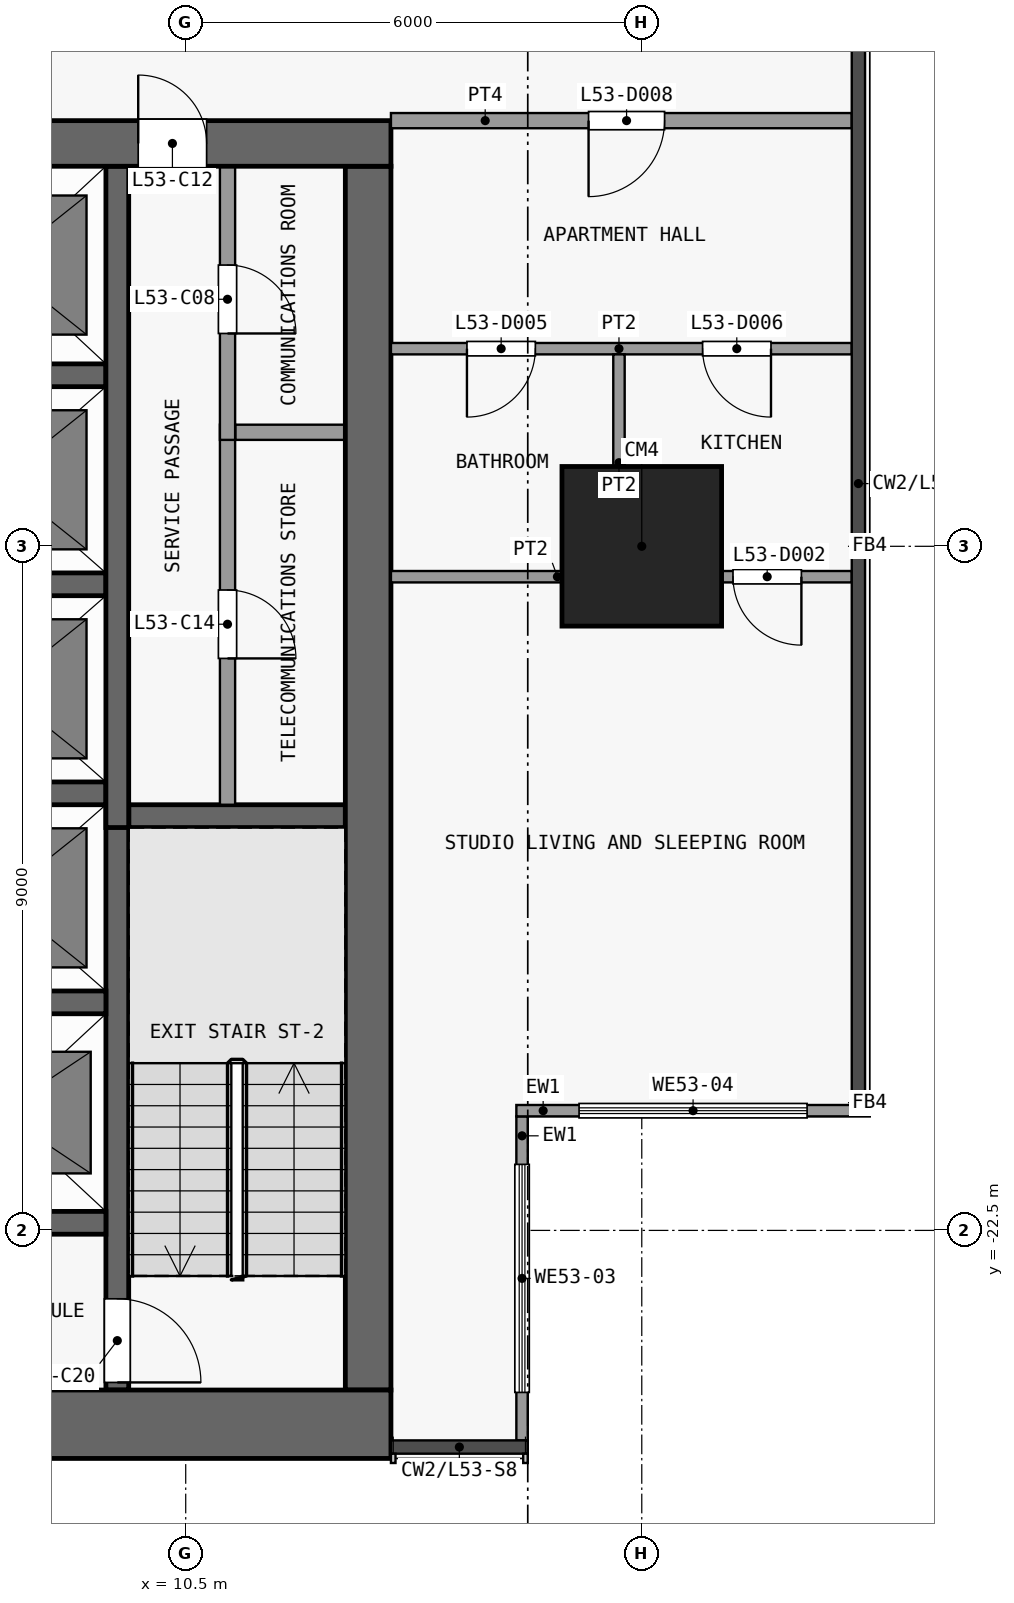
"""IFC4 building model, lengths in metres.
Left out: names, types, materials, properties, quantities, classifications, styles, units other than length and angle.
Written with IfcOpenShell. Run it as: python <this file> out.ifc"""

import sys

from ifc_helpers import new_model, si_unit, direction, frame, frame_2d, origin, origin_2d, place, context, subcontext, project, spatial, rectangle, extrude, element, fill, save


model = new_model("IFC4")
c1 = context("Model", 3, precision=1e-05, world=origin(), true_north=direction((0.0, 1.0)))
c2 = subcontext(c1, "Body", "Model", "MODEL_VIEW")
j1 = project(units=[si_unit("LENGTHUNIT", "METRE"), si_unit("PLANEANGLEUNIT", "RADIAN")], contexts=[c1])
p1 = place(None, origin())
s1 = spatial("IfcSite", under=j1, at=p1, CompositionType="ELEMENT")
p2 = place(p1, origin())
s2 = spatial("IfcBuilding", under=s1, at=p2, CompositionType="ELEMENT")
p3 = place(p2, frame((0.0, 0.0, 212.3)))
s3 = spatial("IfcBuildingStorey", under=s2, at=p3, CompositionType="ELEMENT", Elevation=212.3)
p4 = place(p3, frame((16.5, -13.5, 0.0), z_axis=(0.0, 0.0, 1.0), x_axis=(1.0, 0.0, 0.0)))
e1 = element("IfcColumn", 1, at=p4, inside=s3, PredefinedType="COLUMN", context=c2, shape_type="SweptSolid", body=[
    extrude(rectangle(XDim=2.1, YDim=2.1, at=origin_2d()), origin(), (0.0, 0.0, 1.0), 3.6),
])
p5 = place(p3, frame((-13.2, -25.05, 0.0), z_axis=(0.0, 0.0, 1.0), x_axis=(1.0, 0.0, 0.0)))
e2 = element("IfcWall", 2, at=p5, inside=s3, PredefinedType="SHEAR", context=c2, shape_type="SweptSolid", body=[
    extrude(rectangle(XDim=26.4, YDim=0.9, at=frame_2d((13.2, 0.0))), origin(), (0.0, 0.0, 1.0), 3.3),
])
p6 = place(p3, frame((-13.2, -8.2, 0.0), z_axis=(0.0, 0.0, 1.0), x_axis=(1.0, 0.0, 0.0)))
e3 = element("IfcWall", 3, at=p6, inside=s3, PredefinedType="SHEAR", context=c2, shape_type="SweptSolid", body=[
    extrude(rectangle(XDim=26.4, YDim=0.6, at=frame_2d((13.2, 0.0))), origin(), (0.0, 0.0, 1.0), 3.3),
])
p7 = place(p6, frame((7.5, 0.0, 0.0)))
e4 = element("IfcOpeningElement", 4, at=p7, cuts=e3, PredefinedType="OPENING", context=c2, shape_type="SweptSolid", body=[
    extrude(rectangle(XDim=1.8, YDim=2.1, at=frame_2d((0.9, 1.05))), frame((0.0, 0.31, 0.0), z_axis=(0.0, -1.0, 0.0), x_axis=(1.0, 0.0, 0.0)), (0.0, 0.0, 1.0), 0.62),
])
p8 = place(p6, frame((17.1, 0.0, 0.0)))
e5 = element("IfcOpeningElement", 5, at=p8, cuts=e3, PredefinedType="OPENING", context=c2, shape_type="SweptSolid", body=[
    extrude(rectangle(XDim=1.8, YDim=2.1, at=frame_2d((0.9, 1.05))), frame((0.0, 0.31, 0.0), z_axis=(0.0, -1.0, 0.0), x_axis=(1.0, 0.0, 0.0)), (0.0, 0.0, 1.0), 0.62),
])
p9 = place(p6, frame((2.425, 0.0, 0.0)))
e6 = element("IfcOpeningElement", 6, at=p9, cuts=e3, PredefinedType="OPENING", context=c2, shape_type="SweptSolid", body=[
    extrude(rectangle(XDim=0.9, YDim=2.1, at=frame_2d((0.45, 1.05))), frame((0.0, 0.31, 0.0), z_axis=(0.0, -1.0, 0.0), x_axis=(1.0, 0.0, 0.0)), (0.0, 0.0, 1.0), 0.62),
])
p10 = place(p6, frame((23.075, 0.0, 0.0)))
e7 = element("IfcOpeningElement", 7, at=p10, cuts=e3, PredefinedType="OPENING", context=c2, shape_type="SweptSolid", body=[
    extrude(rectangle(XDim=0.9, YDim=2.1, at=frame_2d((0.45, 1.05))), frame((0.0, 0.31, 0.0), z_axis=(0.0, -1.0, 0.0), x_axis=(1.0, 0.0, 0.0)), (0.0, 0.0, 1.0), 0.62),
])
p11 = place(p3, frame((12.9, -24.6, 0.0), z_axis=(0.0, 0.0, 1.0), x_axis=(0.0, 1.0, 0.0)))
e8 = element("IfcWall", 8, at=p11, inside=s3, PredefinedType="SHEAR", context=c2, shape_type="SweptSolid", body=[
    extrude(rectangle(XDim=16.1, YDim=0.6, at=frame_2d((8.05, 0.0))), origin(), (0.0, 0.0, 1.0), 3.3),
])
for number, where, z_axis, x_axis in (
    (9, (6.65, -22.4, 0.0), (0.0, 0.0, 1.0), (1.0, 0.0, 0.0)),
    (10, (6.65, -19.5, 0.0), (0.0, 0.0, 1.0), (1.0, 0.0, 0.0)),
):
    element("IfcWall", number, at=place(p3, frame(where, z_axis=z_axis, x_axis=x_axis)), inside=s3, PredefinedType="SHEAR", context=c2, shape_type="SweptSolid", body=[
        extrude(rectangle(XDim=2.8, YDim=0.3, at=frame_2d((1.4, 0.0))), origin(), (0.0, 0.0, 1.0), 3.3),
    ])
p12 = place(p3, frame((9.75, -17.05, 0.0), z_axis=(0.0, 0.0, 1.0), x_axis=(1.0, 0.0, 0.0)))
e11 = element("IfcWall", 11, at=p12, inside=s3, PredefinedType="SHEAR", context=c2, shape_type="SweptSolid", body=[
    extrude(rectangle(XDim=2.85, YDim=0.3, at=frame_2d((1.425, 0.0))), origin(), (0.0, 0.0, 1.0), 3.3),
])
for number, where, z_axis, x_axis in (
    (12, (6.65, -16.75, 0.0), (0.0, 0.0, 1.0), (1.0, 0.0, 0.0)),
    (13, (6.65, -14.0, 0.0), (0.0, 0.0, 1.0), (1.0, 0.0, 0.0)),
):
    element("IfcWall", number, at=place(p3, frame(where, z_axis=z_axis, x_axis=x_axis)), inside=s3, PredefinedType="SHEAR", context=c2, shape_type="SweptSolid", body=[
        extrude(rectangle(XDim=2.8, YDim=0.3, at=frame_2d((1.4, 0.0))), origin(), (0.0, 0.0, 1.0), 3.3),
    ])
p13 = place(p3, frame((11.15, -12.0, 0.0), z_axis=(0.0, 0.0, 1.0), x_axis=(1.0, 0.0, 0.0)))
e14 = element("IfcWall", 14, at=p13, inside=s3, PredefinedType="PARTITIONING", context=c2, shape_type="SweptSolid", body=[
    extrude(rectangle(XDim=1.45, YDim=0.2, at=frame_2d((0.725, 0.0))), origin(), (0.0, 0.0, 1.0), 3.3),
])
p14 = place(p3, frame((6.65, -11.25, 0.0), z_axis=(0.0, 0.0, 1.0), x_axis=(1.0, 0.0, 0.0)))
e15 = element("IfcWall", 15, at=p14, inside=s3, PredefinedType="SHEAR", context=c2, shape_type="SweptSolid", body=[
    extrude(rectangle(XDim=2.8, YDim=0.3, at=frame_2d((1.4, 0.0))), origin(), (0.0, 0.0, 1.0), 3.3),
])
p15 = place(p3, frame((9.6, -16.9, 0.0), z_axis=(0.0, 0.0, 1.0), x_axis=(0.0, -1.0, 0.0)))
e16 = element("IfcWall", 16, at=p15, inside=s3, PredefinedType="SHEAR", context=c2, shape_type="SweptSolid", body=[
    extrude(rectangle(XDim=7.7, YDim=0.3, at=frame_2d((3.85, 0.0))), origin(), (0.0, 0.0, 1.0), 3.3),
])
p16 = place(p15, frame((6.5, 0.0, 0.0)))
e17 = element("IfcOpeningElement", 17, at=p16, cuts=e16, PredefinedType="OPENING", context=c2, shape_type="SweptSolid", body=[
    extrude(rectangle(XDim=1.1, YDim=2.1, at=frame_2d((0.55, 1.05))), frame((0.0, 0.16, 0.0), z_axis=(0.0, -1.0, 0.0), x_axis=(1.0, 0.0, 0.0)), (0.0, 0.0, 1.0), 0.32),
])
p17 = place(p3, frame((9.6, -17.2, 0.0), z_axis=(0.0, 0.0, 1.0), x_axis=(0.0, 1.0, 0.0)))
e18 = element("IfcWall", 18, at=p17, inside=s3, PredefinedType="SHEAR", context=c2, shape_type="SweptSolid", body=[
    extrude(rectangle(XDim=8.7, YDim=0.3, at=frame_2d((4.35, 0.0))), origin(), (0.0, 0.0, 1.0), 3.3),
])
p18 = place(p3, frame((11.05, -11.9, 0.0), z_axis=(0.0, 0.0, 1.0), x_axis=(0.0, -1.0, 0.0)))
e19 = element("IfcWall", 19, at=p18, inside=s3, PredefinedType="PARTITIONING", context=c2, shape_type="SweptSolid", body=[
    extrude(rectangle(XDim=5.0, YDim=0.2, at=frame_2d((2.5, 0.0))), origin(), (0.0, 0.0, 1.0), 3.3),
])
p19 = place(p18, frame((2.175, 0.0, 0.0)))
e20 = element("IfcOpeningElement", 20, at=p19, cuts=e19, PredefinedType="OPENING", context=c2, shape_type="SweptSolid", body=[
    extrude(rectangle(XDim=0.9, YDim=2.1, at=frame_2d((0.45, 1.05))), frame((0.0, 0.11, 0.0), z_axis=(0.0, -1.0, 0.0), x_axis=(1.0, 0.0, 0.0)), (0.0, 0.0, 1.0), 0.22),
])
p20 = place(p3, frame((11.05, -8.5, 0.0), z_axis=(0.0, 0.0, 1.0), x_axis=(0.0, -1.0, 0.0)))
e21 = element("IfcWall", 21, at=p20, inside=s3, PredefinedType="PARTITIONING", context=c2, shape_type="SweptSolid", body=[
    extrude(rectangle(XDim=3.6, YDim=0.2, at=frame_2d((1.8, 0.0))), origin(), (0.0, 0.0, 1.0), 3.3),
])
p21 = place(p20, frame((1.3, 0.0, 0.0)))
e22 = element("IfcOpeningElement", 22, at=p21, cuts=e21, PredefinedType="OPENING", context=c2, shape_type="SweptSolid", body=[
    extrude(rectangle(XDim=0.9, YDim=2.1, at=frame_2d((0.45, 1.05))), frame((0.0, 0.11, 0.0), z_axis=(0.0, -1.0, 0.0), x_axis=(1.0, 0.0, 0.0)), (0.0, 0.0, 1.0), 0.22),
])
p22 = place(p3, frame((14.925, -21.0, 0.0), z_axis=(0.0, 0.0, 1.0), x_axis=(0.0, -1.0, 0.0)))
e23 = element("IfcWall", 23, at=p22, inside=s3, PredefinedType="SOLIDWALL", context=c2, shape_type="SweptSolid", body=[
    extrude(rectangle(XDim=4.262, YDim=0.15, at=frame_2d((2.131, 0.0))), origin(), (0.0, 0.0, 1.0), 3.3),
])
p23 = place(p22, frame((0.631, 0.0, 0.9)))
e24 = element("IfcOpeningElement", 24, at=p23, cuts=e23, PredefinedType="OPENING", context=c2, shape_type="SweptSolid", body=[
    extrude(rectangle(XDim=3.0, YDim=2.4, at=frame_2d((1.5, 1.2))), frame((0.0, 0.085, 0.0), z_axis=(0.0, -1.0, 0.0), x_axis=(1.0, 0.0, 0.0)), (0.0, 0.0, 1.0), 0.17),
])
p24 = place(p3, frame((19.5, -20.925, 0.0), z_axis=(0.0, 0.0, 1.0), x_axis=(-1.0, 0.0, 0.0)))
e25 = element("IfcWall", 25, at=p24, inside=s3, PredefinedType="SOLIDWALL", context=c2, shape_type="SweptSolid", body=[
    extrude(rectangle(XDim=4.65, YDim=0.15, at=frame_2d((2.325, 0.0))), origin(), (0.0, 0.0, 1.0), 3.3),
])
p25 = place(p24, frame((0.825, 0.0, 0.9)))
e26 = element("IfcOpeningElement", 26, at=p25, cuts=e25, PredefinedType="OPENING", context=c2, shape_type="SweptSolid", body=[
    extrude(rectangle(XDim=3.0, YDim=2.4, at=frame_2d((1.5, 1.2))), frame((0.0, 0.085, 0.0), z_axis=(0.0, -1.0, 0.0), x_axis=(1.0, 0.0, 0.0)), (0.0, 0.0, 1.0), 0.17),
])
p26 = place(p3, frame((13.2, -13.9, 0.0), z_axis=(0.0, 0.0, 1.0), x_axis=(1.0, 0.0, 0.0)))
e27 = element("IfcWall", 27, at=p26, inside=s3, PredefinedType="PARTITIONING", context=c2, shape_type="SweptSolid", body=[
    extrude(rectangle(XDim=6.062, YDim=0.15, at=frame_2d((3.031, 0.0))), origin(), (0.0, 0.0, 1.0), 3.3),
])
p27 = place(p26, frame((4.5, 0.0, 0.0)))
e28 = element("IfcOpeningElement", 28, at=p27, cuts=e27, PredefinedType="OPENING", context=c2, shape_type="SweptSolid", body=[
    extrude(rectangle(XDim=0.9, YDim=2.1, at=frame_2d((0.45, 1.05))), frame((0.0, 0.085, 0.0), z_axis=(0.0, -1.0, 0.0), x_axis=(1.0, 0.0, 0.0)), (0.0, 0.0, 1.0), 0.17),
])
p28 = place(p3, frame((13.2, -10.9, 0.0), z_axis=(0.0, 0.0, 1.0), x_axis=(1.0, 0.0, 0.0)))
e29 = element("IfcWall", 29, at=p28, inside=s3, PredefinedType="PARTITIONING", context=c2, shape_type="SweptSolid", body=[
    extrude(rectangle(XDim=6.062, YDim=0.15, at=frame_2d((3.031, 0.0))), origin(), (0.0, 0.0, 1.0), 3.3),
])
p29 = place(p28, frame((1.0, 0.0, 0.0)))
e30 = element("IfcOpeningElement", 30, at=p29, cuts=e29, PredefinedType="OPENING", context=c2, shape_type="SweptSolid", body=[
    extrude(rectangle(XDim=0.9, YDim=2.1, at=frame_2d((0.45, 1.05))), frame((0.0, 0.085, 0.0), z_axis=(0.0, -1.0, 0.0), x_axis=(1.0, 0.0, 0.0)), (0.0, 0.0, 1.0), 0.17),
])
p30 = place(p28, frame((4.1, 0.0, 0.0)))
e31 = element("IfcOpeningElement", 31, at=p30, cuts=e29, PredefinedType="OPENING", context=c2, shape_type="SweptSolid", body=[
    extrude(rectangle(XDim=0.9, YDim=2.1, at=frame_2d((0.45, 1.05))), frame((0.0, 0.085, 0.0), z_axis=(0.0, -1.0, 0.0), x_axis=(1.0, 0.0, 0.0)), (0.0, 0.0, 1.0), 0.17),
])
p31 = place(p3, frame((13.2, -7.9, 0.0), z_axis=(0.0, 0.0, 1.0), x_axis=(1.0, 0.0, 0.0)))
e32 = element("IfcWall", 32, at=p31, inside=s3, PredefinedType="PARTITIONING", context=c2, shape_type="SweptSolid", body=[
    extrude(rectangle(XDim=6.062, YDim=0.2, at=frame_2d((3.031, 0.0))), origin(), (0.0, 0.0, 1.0), 3.3),
])
p32 = place(p31, frame((2.6, 0.0, 0.0)))
e33 = element("IfcOpeningElement", 33, at=p32, cuts=e32, PredefinedType="OPENING", context=c2, shape_type="SweptSolid", body=[
    extrude(rectangle(XDim=1.0, YDim=2.1, at=frame_2d((0.5, 1.05))), frame((0.0, 0.11, 0.0), z_axis=(0.0, -1.0, 0.0), x_axis=(1.0, 0.0, 0.0)), (0.0, 0.0, 1.0), 0.22),
])
p33 = place(p3, frame((16.2, -13.825, 0.0), z_axis=(0.0, 0.0, 1.0), x_axis=(0.0, 1.0, 0.0)))
e34 = element("IfcWall", 34, at=p33, inside=s3, PredefinedType="PARTITIONING", context=c2, shape_type="SweptSolid", body=[
    extrude(rectangle(XDim=2.85, YDim=0.15, at=frame_2d((1.425, 0.0))), origin(), (0.0, 0.0, 1.0), 3.3),
])
p34 = place(p21, origin())
e35 = element("IfcDoor", 35, at=p34, inside=s3, OperationType="SINGLE_SWING_RIGHT", PredefinedType="DOOR", context=c2, shape_type="SweptSolid", body=[
    extrude(rectangle(XDim=0.9, YDim=2.1, at=frame_2d((0.45, 1.05))), frame((0.0, 0.025, 0.0), z_axis=(0.0, -1.0, 0.0), x_axis=(1.0, 0.0, 0.0)), (0.0, 0.0, 1.0), 0.05),
])
fill(e22, e35)
p35 = place(p10, origin())
e36 = element("IfcDoor", 36, at=p35, inside=s3, OperationType="SINGLE_SWING_LEFT", PredefinedType="DOOR", context=c2, shape_type="SweptSolid", body=[
    extrude(rectangle(XDim=0.9, YDim=2.1, at=frame_2d((0.45, 1.05))), frame((0.0, 0.025, 0.0), z_axis=(0.0, -1.0, 0.0), x_axis=(1.0, 0.0, 0.0)), (0.0, 0.0, 1.0), 0.05),
])
fill(e7, e36)
p36 = place(p19, origin())
e37 = element("IfcDoor", 37, at=p36, inside=s3, OperationType="SINGLE_SWING_RIGHT", PredefinedType="DOOR", context=c2, shape_type="SweptSolid", body=[
    extrude(rectangle(XDim=0.9, YDim=2.1, at=frame_2d((0.45, 1.05))), frame((0.0, 0.025, 0.0), z_axis=(0.0, -1.0, 0.0), x_axis=(1.0, 0.0, 0.0)), (0.0, 0.0, 1.0), 0.05),
])
fill(e20, e37)
p37 = place(p16, origin())
e38 = element("IfcDoor", 38, at=p37, inside=s3, OperationType="SINGLE_SWING_RIGHT", PredefinedType="DOOR", context=c2, shape_type="SweptSolid", body=[
    extrude(rectangle(XDim=1.1, YDim=2.1, at=frame_2d((0.55, 1.05))), frame((0.0, 0.025, 0.0), z_axis=(0.0, -1.0, 0.0), x_axis=(1.0, 0.0, 0.0)), (0.0, 0.0, 1.0), 0.05),
])
fill(e17, e38)
p38 = place(p23, origin())
e39 = element("IfcWindow", 39, at=p38, inside=s3, PartitioningType="SINGLE_PANEL", PredefinedType="WINDOW", context=c2, shape_type="SweptSolid", body=[
    extrude(rectangle(XDim=3.0, YDim=2.4, at=frame_2d((1.5, 1.2))), frame((0.0, 0.03, 0.0), z_axis=(0.0, -1.0, 0.0), x_axis=(1.0, 0.0, 0.0)), (0.0, 0.0, 1.0), 0.06),
])
fill(e24, e39)
p39 = place(p25, origin())
e40 = element("IfcWindow", 40, at=p39, inside=s3, PartitioningType="SINGLE_PANEL", PredefinedType="WINDOW", context=c2, shape_type="SweptSolid", body=[
    extrude(rectangle(XDim=3.0, YDim=2.4, at=frame_2d((1.5, 1.2))), frame((0.0, 0.03, 0.0), z_axis=(0.0, -1.0, 0.0), x_axis=(1.0, 0.0, 0.0)), (0.0, 0.0, 1.0), 0.06),
])
fill(e26, e40)
p40 = place(p27, origin())
e41 = element("IfcDoor", 41, at=p40, inside=s3, OperationType="SINGLE_SWING_RIGHT", PredefinedType="DOOR", context=c2, shape_type="SweptSolid", body=[
    extrude(rectangle(XDim=0.9, YDim=2.1, at=frame_2d((0.45, 1.05))), frame((0.0, 0.025, 0.0), z_axis=(0.0, -1.0, 0.0), x_axis=(1.0, 0.0, 0.0)), (0.0, 0.0, 1.0), 0.05),
])
fill(e28, e41)
p41 = place(p29, origin())
e42 = element("IfcDoor", 42, at=p41, inside=s3, OperationType="SINGLE_SWING_LEFT", PredefinedType="DOOR", context=c2, shape_type="SweptSolid", body=[
    extrude(rectangle(XDim=0.9, YDim=2.1, at=frame_2d((0.45, 1.05))), frame((0.0, 0.025, 0.0), z_axis=(0.0, -1.0, 0.0), x_axis=(1.0, 0.0, 0.0)), (0.0, 0.0, 1.0), 0.05),
])
fill(e30, e42)
p42 = place(p30, origin())
e43 = element("IfcDoor", 43, at=p42, inside=s3, OperationType="SINGLE_SWING_RIGHT", PredefinedType="DOOR", context=c2, shape_type="SweptSolid", body=[
    extrude(rectangle(XDim=0.9, YDim=2.1, at=frame_2d((0.45, 1.05))), frame((0.0, 0.025, 0.0), z_axis=(0.0, -1.0, 0.0), x_axis=(1.0, 0.0, 0.0)), (0.0, 0.0, 1.0), 0.05),
])
fill(e31, e43)
p43 = place(p32, origin())
e44 = element("IfcDoor", 44, at=p43, inside=s3, OperationType="SINGLE_SWING_LEFT", PredefinedType="DOOR", context=c2, shape_type="SweptSolid", body=[
    extrude(rectangle(XDim=1.0, YDim=2.1, at=frame_2d((0.5, 1.05))), frame((0.0, 0.025, 0.0), z_axis=(0.0, -1.0, 0.0), x_axis=(1.0, 0.0, 0.0)), (0.0, 0.0, 1.0), 0.05),
])
fill(e33, e44)
save(model, sys.argv[1])
